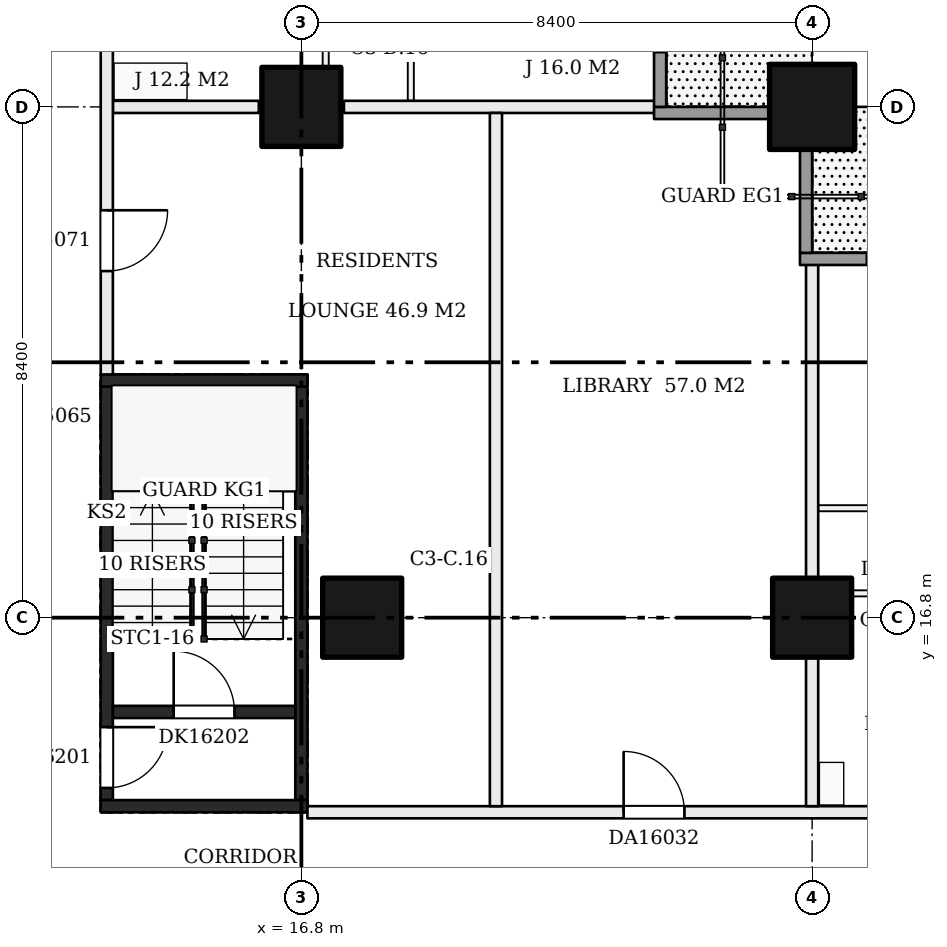
"""IFC4 building model, lengths in metres.
Left out: names, types, materials, properties, quantities, classifications, styles, units other than length and angle.
Written with IfcOpenShell. Run it as: python <this file> out.ifc"""

import sys

from ifc_helpers import new_model, si_unit, direction, frame, frame_2d, origin, origin_2d, place, context, subcontext, project, spatial, rectangle, extrude, element, fill, save


model = new_model("IFC4")
c1 = context("Model", 3, precision=1e-05, world=origin(), true_north=direction((0.0, 1.0)))
c2 = subcontext(c1, "Body", "Model", "MODEL_VIEW")
j1 = project(units=[si_unit("LENGTHUNIT", "METRE"), si_unit("PLANEANGLEUNIT", "RADIAN")], contexts=[c1])
p1 = place(None, origin())
s1 = spatial("IfcSite", under=j1, at=p1, CompositionType="ELEMENT")
p2 = place(p1, origin())
s2 = spatial("IfcBuilding", under=s1, at=p2, CompositionType="ELEMENT")
p3 = place(p2, frame((0.0, 0.0, 67.2)))
s3 = spatial("IfcBuildingStorey", under=s2, at=p3, CompositionType="ELEMENT", Elevation=67.2)
for number, where, z_axis, x_axis in (
    (1, (17.8, 16.8, 0.0), (0.0, 0.0, 1.0), (1.0, 0.0, 0.0)),
    (2, (16.8, 25.2, 0.0), (0.0, 0.0, 1.0), (1.0, 0.0, 0.0)),
    (3, (25.2, 16.8, 0.0), (0.0, 0.0, 1.0), (1.0, 0.0, 0.0)),
):
    element("IfcColumn", number, at=place(p3, frame(where, z_axis=z_axis, x_axis=x_axis)), inside=s3, PredefinedType="COLUMN", context=c2, shape_type="SweptSolid", body=[
        extrude(rectangle(XDim=1.3, YDim=1.3, at=origin_2d()), origin(), (0.0, 0.0, 1.0), 3.22),
    ])
p4 = place(p3, frame((25.2, 25.2, 0.0), z_axis=(0.0, 0.0, 1.0), x_axis=(1.0, 0.0, 0.0)))
e4 = element("IfcColumn", 4, at=p4, inside=s3, PredefinedType="COLUMN", context=c2, shape_type="SweptSolid", body=[
    extrude(rectangle(XDim=1.4, YDim=1.4, at=origin_2d()), origin(), (0.0, 0.0, 1.0), 3.22),
])
p5 = place(p3, frame((13.6, 13.8, 0.0), z_axis=(0.0, 0.0, 1.0), x_axis=(0.0, 1.0, 0.0)))
e5 = element("IfcWall", 5, at=p5, inside=s3, PredefinedType="SHEAR", context=c2, shape_type="SweptSolid", body=[
    extrude(rectangle(XDim=6.8, YDim=0.2, at=frame_2d((3.4, 0.0))), origin(), (0.0, 0.0, 1.0), 3.22),
])
p6 = place(p5, frame((0.2, 0.0, 0.0)))
e6 = element("IfcOpeningElement", 6, at=p6, cuts=e5, PredefinedType="OPENING", context=c2, shape_type="SweptSolid", body=[
    extrude(rectangle(XDim=1.0, YDim=2.1, at=frame_2d((0.5, 1.05))), frame((0.0, 0.11, 0.0), z_axis=(0.0, -1.0, 0.0), x_axis=(1.0, 0.0, 0.0)), (0.0, 0.0, 1.0), 0.22),
])
p7 = place(p3, frame((16.8, 13.8, 0.0), z_axis=(0.0, 0.0, 1.0), x_axis=(0.0, 1.0, 0.0)))
e7 = element("IfcWall", 7, at=p7, inside=s3, PredefinedType="SHEAR", context=c2, shape_type="SweptSolid", body=[
    extrude(rectangle(XDim=6.8, YDim=0.2, at=frame_2d((3.4, 0.0))), origin(), (0.0, 0.0, 1.0), 3.22),
])
for number, where, z_axis, x_axis in (
    (8, (13.5, 13.7, 0.0), (0.0, 0.0, 1.0), (1.0, 0.0, 0.0)),
    (9, (13.5, 20.7, 0.0), (0.0, 0.0, 1.0), (1.0, 0.0, 0.0)),
):
    element("IfcWall", number, at=place(p3, frame(where, z_axis=z_axis, x_axis=x_axis)), inside=s3, PredefinedType="SHEAR", context=c2, shape_type="SweptSolid", body=[
        extrude(rectangle(XDim=3.4, YDim=0.2, at=frame_2d((1.7, 0.0))), origin(), (0.0, 0.0, 1.0), 3.22),
    ])
p8 = place(p3, frame((13.7, 15.25, 0.0), z_axis=(0.0, 0.0, 1.0), x_axis=(1.0, 0.0, 0.0)))
e10 = element("IfcWall", 10, at=p8, inside=s3, PredefinedType="SHEAR", context=c2, shape_type="SweptSolid", body=[
    extrude(rectangle(XDim=3.0, YDim=0.2, at=frame_2d((1.5, 0.0))), origin(), (0.0, 0.0, 1.0), 3.22),
])
p9 = place(p8, frame((1.0, 0.0, 0.0)))
e11 = element("IfcOpeningElement", 11, at=p9, cuts=e10, PredefinedType="OPENING", context=c2, shape_type="SweptSolid", body=[
    extrude(rectangle(XDim=1.0, YDim=2.1, at=frame_2d((0.5, 1.05))), frame((0.0, 0.11, 0.0), z_axis=(0.0, -1.0, 0.0), x_axis=(1.0, 0.0, 0.0)), (0.0, 0.0, 1.0), 0.22),
])
p10 = place(p3, frame((16.9, 13.6, 0.0), z_axis=(0.0, 0.0, 1.0), x_axis=(1.0, 0.0, 0.0)))
e12 = element("IfcWall", 12, at=p10, inside=s3, PredefinedType="PARTITIONING", context=c2, shape_type="SweptSolid", body=[
    extrude(rectangle(XDim=25.1, YDim=0.2, at=frame_2d((12.55, 0.0))), origin(), (0.0, 0.0, 1.0), 3.22),
])
p11 = place(p10, frame((15.1, 0.0, 0.0)))
e13 = element("IfcOpeningElement", 13, at=p11, cuts=e12, PredefinedType="OPENING", context=c2, shape_type="SweptSolid", body=[
    extrude(rectangle(XDim=1.0, YDim=2.1, at=frame_2d((0.5, 1.05))), frame((0.0, 0.11, 0.0), z_axis=(0.0, -1.0, 0.0), x_axis=(1.0, 0.0, 0.0)), (0.0, 0.0, 1.0), 0.22),
])
p12 = place(p10, frame((23.64, 0.0, 0.0)))
e14 = element("IfcOpeningElement", 14, at=p12, cuts=e12, PredefinedType="OPENING", context=c2, shape_type="SweptSolid", body=[
    extrude(rectangle(XDim=1.0, YDim=2.1, at=frame_2d((0.5, 1.05))), frame((0.0, 0.11, 0.0), z_axis=(0.0, -1.0, 0.0), x_axis=(1.0, 0.0, 0.0)), (0.0, 0.0, 1.0), 0.22),
])
p13 = place(p10, frame((5.2, 0.0, 0.0)))
e15 = element("IfcOpeningElement", 15, at=p13, cuts=e12, PredefinedType="OPENING", context=c2, shape_type="SweptSolid", body=[
    extrude(rectangle(XDim=1.0, YDim=2.1, at=frame_2d((0.5, 1.05))), frame((0.0, 0.11, 0.0), z_axis=(0.0, -1.0, 0.0), x_axis=(1.0, 0.0, 0.0)), (0.0, 0.0, 1.0), 0.22),
])
p14 = place(p3, frame((25.3, 17.2, 0.0), z_axis=(0.0, 0.0, 1.0), x_axis=(1.0, 0.0, 0.0)))
e16 = element("IfcWall", 16, at=p14, inside=s3, PredefinedType="PARTITIONING", context=c2, shape_type="SweptSolid", body=[
    extrude(rectangle(XDim=12.4, YDim=0.1, at=frame_2d((6.2, 0.0))), origin(), (0.0, 0.0, 1.0), 3.22),
])
p15 = place(p14, frame((6.5, 0.0, 0.0)))
e17 = element("IfcOpeningElement", 17, at=p15, cuts=e16, PredefinedType="OPENING", context=c2, shape_type="SweptSolid", body=[
    extrude(rectangle(XDim=0.9, YDim=2.1, at=frame_2d((0.45, 1.05))), frame((0.0, 0.06, 0.0), z_axis=(0.0, -1.0, 0.0), x_axis=(1.0, 0.0, 0.0)), (0.0, 0.0, 1.0), 0.12),
])
p16 = place(p14, frame((1.0, 0.0, 0.0)))
e18 = element("IfcOpeningElement", 18, at=p16, cuts=e16, PredefinedType="OPENING", context=c2, shape_type="SweptSolid", body=[
    extrude(rectangle(XDim=0.9, YDim=2.1, at=frame_2d((0.45, 1.05))), frame((0.0, 0.06, 0.0), z_axis=(0.0, -1.0, 0.0), x_axis=(1.0, 0.0, 0.0)), (0.0, 0.0, 1.0), 0.12),
])
p17 = place(p14, frame((4.0, 0.0, 0.0)))
e19 = element("IfcOpeningElement", 19, at=p17, cuts=e16, PredefinedType="OPENING", context=c2, shape_type="SweptSolid", body=[
    extrude(rectangle(XDim=0.9, YDim=2.1, at=frame_2d((0.45, 1.05))), frame((0.0, 0.06, 0.0), z_axis=(0.0, -1.0, 0.0), x_axis=(1.0, 0.0, 0.0)), (0.0, 0.0, 1.0), 0.12),
])
p18 = place(p14, frame((10.1, 0.0, 0.0)))
e20 = element("IfcOpeningElement", 20, at=p18, cuts=e16, PredefinedType="OPENING", context=c2, shape_type="SweptSolid", body=[
    extrude(rectangle(XDim=0.9, YDim=2.1, at=frame_2d((0.45, 1.05))), frame((0.0, 0.06, 0.0), z_axis=(0.0, -1.0, 0.0), x_axis=(1.0, 0.0, 0.0)), (0.0, 0.0, 1.0), 0.12),
])
p19 = place(p3, frame((25.3, 18.6, 0.0), z_axis=(0.0, 0.0, 1.0), x_axis=(1.0, 0.0, 0.0)))
e21 = element("IfcWall", 21, at=p19, inside=s3, PredefinedType="PARTITIONING", context=c2, shape_type="SweptSolid", body=[
    extrude(rectangle(XDim=16.7, YDim=0.1, at=frame_2d((8.35, 0.0))), origin(), (0.0, 0.0, 1.0), 3.22),
])
p20 = place(p19, frame((1.5, 0.0, 0.0)))
e22 = element("IfcOpeningElement", 22, at=p20, cuts=e21, PredefinedType="OPENING", context=c2, shape_type="SweptSolid", body=[
    extrude(rectangle(XDim=0.9, YDim=2.1, at=frame_2d((0.45, 1.05))), frame((0.0, 0.06, 0.0), z_axis=(0.0, -1.0, 0.0), x_axis=(1.0, 0.0, 0.0)), (0.0, 0.0, 1.0), 0.12),
])
p21 = place(p19, frame((6.9, 0.0, 0.0)))
e23 = element("IfcOpeningElement", 23, at=p21, cuts=e21, PredefinedType="OPENING", context=c2, shape_type="SweptSolid", body=[
    extrude(rectangle(XDim=0.9, YDim=2.1, at=frame_2d((0.45, 1.05))), frame((0.0, 0.06, 0.0), z_axis=(0.0, -1.0, 0.0), x_axis=(1.0, 0.0, 0.0)), (0.0, 0.0, 1.0), 0.12),
])
p22 = place(p19, frame((15.24, 0.0, 0.0)))
e24 = element("IfcOpeningElement", 24, at=p22, cuts=e21, PredefinedType="OPENING", context=c2, shape_type="SweptSolid", body=[
    extrude(rectangle(XDim=0.9, YDim=2.1, at=frame_2d((0.45, 1.05))), frame((0.0, 0.06, 0.0), z_axis=(0.0, -1.0, 0.0), x_axis=(1.0, 0.0, 0.0)), (0.0, 0.0, 1.0), 0.12),
])
p23 = place(p19, frame((13.2, 0.0, 0.0)))
e25 = element("IfcOpeningElement", 25, at=p23, cuts=e21, PredefinedType="OPENING", context=c2, shape_type="SweptSolid", body=[
    extrude(rectangle(XDim=0.9, YDim=2.1, at=frame_2d((0.45, 1.05))), frame((0.0, 0.06, 0.0), z_axis=(0.0, -1.0, 0.0), x_axis=(1.0, 0.0, 0.0)), (0.0, 0.0, 1.0), 0.12),
])
p24 = place(p3, frame((13.7, 25.2, 0.0), z_axis=(0.0, 0.0, 1.0), x_axis=(1.0, 0.0, 0.0)))
e26 = element("IfcWall", 26, at=p24, inside=s3, PredefinedType="PARTITIONING", context=c2, shape_type="SweptSolid", body=[
    extrude(rectangle(XDim=2.4, YDim=0.2, at=frame_2d((1.2, 0.0))), origin(), (0.0, 0.0, 1.0), 3.22),
])
p25 = place(p3, frame((17.5, 25.2, 0.0), z_axis=(0.0, 0.0, 1.0), x_axis=(1.0, 0.0, 0.0)))
e27 = element("IfcWall", 27, at=p25, inside=s3, PredefinedType="PARTITIONING", context=c2, shape_type="SweptSolid", body=[
    extrude(rectangle(XDim=5.2, YDim=0.2, at=frame_2d((2.6, 0.0))), origin(), (0.0, 0.0, 1.0), 3.22),
])
p26 = place(p3, frame((13.6, 20.8, 0.0), z_axis=(0.0, 0.0, 1.0), x_axis=(0.0, 1.0, 0.0)))
e28 = element("IfcWall", 28, at=p26, inside=s3, PredefinedType="PARTITIONING", context=c2, shape_type="SweptSolid", body=[
    extrude(rectangle(XDim=21.2, YDim=0.2, at=frame_2d((10.6, 0.0))), origin(), (0.0, 0.0, 1.0), 3.22),
])
p27 = place(p26, frame((15.0, 0.0, 0.0)))
e29 = element("IfcOpeningElement", 29, at=p27, cuts=e28, PredefinedType="OPENING", context=c2, shape_type="SweptSolid", body=[
    extrude(rectangle(XDim=1.0, YDim=2.1, at=frame_2d((0.5, 1.05))), frame((0.0, 0.11, 0.0), z_axis=(0.0, -1.0, 0.0), x_axis=(1.0, 0.0, 0.0)), (0.0, 0.0, 1.0), 0.22),
])
p28 = place(p26, frame((17.5, 0.0, 0.0)))
e30 = element("IfcOpeningElement", 30, at=p28, cuts=e28, PredefinedType="OPENING", context=c2, shape_type="SweptSolid", body=[
    extrude(rectangle(XDim=1.0, YDim=2.1, at=frame_2d((0.5, 1.05))), frame((0.0, 0.11, 0.0), z_axis=(0.0, -1.0, 0.0), x_axis=(1.0, 0.0, 0.0)), (0.0, 0.0, 1.0), 0.22),
])
p29 = place(p26, frame((1.7, 0.0, 0.0)))
e31 = element("IfcOpeningElement", 31, at=p29, cuts=e28, PredefinedType="OPENING", context=c2, shape_type="SweptSolid", body=[
    extrude(rectangle(XDim=1.0, YDim=2.1, at=frame_2d((0.5, 1.05))), frame((0.0, 0.11, 0.0), z_axis=(0.0, -1.0, 0.0), x_axis=(1.0, 0.0, 0.0)), (0.0, 0.0, 1.0), 0.22),
])
p30 = place(p3, frame((17.2, 25.3, 0.0), z_axis=(0.0, 0.0, 1.0), x_axis=(0.0, 1.0, 0.0)))
e32 = element("IfcWall", 32, at=p30, inside=s3, PredefinedType="PARTITIONING", context=c2, shape_type="SweptSolid", body=[
    extrude(rectangle(XDim=12.4, YDim=0.1, at=frame_2d((6.2, 0.0))), origin(), (0.0, 0.0, 1.0), 3.22),
])
p31 = place(p30, frame((10.5, 0.0, 0.0)))
e33 = element("IfcOpeningElement", 33, at=p31, cuts=e32, PredefinedType="OPENING", context=c2, shape_type="SweptSolid", body=[
    extrude(rectangle(XDim=0.9, YDim=2.1, at=frame_2d((0.45, 1.05))), frame((0.0, 0.06, 0.0), z_axis=(0.0, -1.0, 0.0), x_axis=(1.0, 0.0, 0.0)), (0.0, 0.0, 1.0), 0.12),
])
p32 = place(p30, frame((1.4, 0.0, 0.0)))
e34 = element("IfcOpeningElement", 34, at=p32, cuts=e32, PredefinedType="OPENING", context=c2, shape_type="SweptSolid", body=[
    extrude(rectangle(XDim=0.9, YDim=2.1, at=frame_2d((0.45, 1.05))), frame((0.0, 0.06, 0.0), z_axis=(0.0, -1.0, 0.0), x_axis=(1.0, 0.0, 0.0)), (0.0, 0.0, 1.0), 0.12),
])
p33 = place(p30, frame((4.6, 0.0, 0.0)))
e35 = element("IfcOpeningElement", 35, at=p33, cuts=e32, PredefinedType="OPENING", context=c2, shape_type="SweptSolid", body=[
    extrude(rectangle(XDim=0.9, YDim=2.1, at=frame_2d((0.45, 1.05))), frame((0.0, 0.06, 0.0), z_axis=(0.0, -1.0, 0.0), x_axis=(1.0, 0.0, 0.0)), (0.0, 0.0, 1.0), 0.12),
])
p34 = place(p30, frame((6.5, 0.0, 0.0)))
e36 = element("IfcOpeningElement", 36, at=p34, cuts=e32, PredefinedType="OPENING", context=c2, shape_type="SweptSolid", body=[
    extrude(rectangle(XDim=0.9, YDim=2.1, at=frame_2d((0.45, 1.05))), frame((0.0, 0.06, 0.0), z_axis=(0.0, -1.0, 0.0), x_axis=(1.0, 0.0, 0.0)), (0.0, 0.0, 1.0), 0.12),
])
p35 = place(p3, frame((18.6, 25.3, 0.0), z_axis=(0.0, 0.0, 1.0), x_axis=(0.0, 1.0, 0.0)))
e37 = element("IfcWall", 37, at=p35, inside=s3, PredefinedType="PARTITIONING", context=c2, shape_type="SweptSolid", body=[
    extrude(rectangle(XDim=12.4, YDim=0.1, at=frame_2d((6.2, 0.0))), origin(), (0.0, 0.0, 1.0), 3.22),
])
p36 = place(p35, frame((1.5, 0.0, 0.0)))
e38 = element("IfcOpeningElement", 38, at=p36, cuts=e37, PredefinedType="OPENING", context=c2, shape_type="SweptSolid", body=[
    extrude(rectangle(XDim=0.9, YDim=2.1, at=frame_2d((0.45, 1.05))), frame((0.0, 0.06, 0.0), z_axis=(0.0, -1.0, 0.0), x_axis=(1.0, 0.0, 0.0)), (0.0, 0.0, 1.0), 0.12),
])
p37 = place(p35, frame((6.9, 0.0, 0.0)))
e39 = element("IfcOpeningElement", 39, at=p37, cuts=e37, PredefinedType="OPENING", context=c2, shape_type="SweptSolid", body=[
    extrude(rectangle(XDim=0.9, YDim=2.1, at=frame_2d((0.45, 1.05))), frame((0.0, 0.06, 0.0), z_axis=(0.0, -1.0, 0.0), x_axis=(1.0, 0.0, 0.0)), (0.0, 0.0, 1.0), 0.12),
])
p38 = place(p3, frame((20.0, 13.7, 0.0), z_axis=(0.0, 0.0, 1.0), x_axis=(0.0, 1.0, 0.0)))
e40 = element("IfcWall", 40, at=p38, inside=s3, PredefinedType="PARTITIONING", context=c2, shape_type="SweptSolid", body=[
    extrude(rectangle(XDim=11.4, YDim=0.2, at=frame_2d((5.7, 0.0))), origin(), (0.0, 0.0, 1.0), 3.22),
])
p39 = place(p3, frame((25.2, 13.7, 0.0), z_axis=(0.0, 0.0, 1.0), x_axis=(0.0, 1.0, 0.0)))
e41 = element("IfcWall", 41, at=p39, inside=s3, PredefinedType="PARTITIONING", context=c2, shape_type="SweptSolid", body=[
    extrude(rectangle(XDim=9.0, YDim=0.2, at=frame_2d((4.5, 0.0))), origin(), (0.0, 0.0, 1.0), 3.22),
])
p40 = place(p3, frame((42.0, 22.7, 0.0), z_axis=(0.0, 0.0, 1.0), x_axis=(-1.0, 0.0, 0.0)))
e42 = element("IfcWall", 42, at=p40, inside=s3, PredefinedType="SOLIDWALL", context=c2, shape_type="SweptSolid", body=[
    extrude(rectangle(XDim=17.0, YDim=0.2, at=frame_2d((8.5, 0.0))), origin(), (0.0, 0.0, 1.0), 3.22),
])
p41 = place(p40, frame((13.5, 0.0, 0.9)))
e43 = element("IfcOpeningElement", 43, at=p41, cuts=e42, PredefinedType="OPENING", context=c2, shape_type="SweptSolid", body=[
    extrude(rectangle(XDim=2.4, YDim=1.5, at=frame_2d((1.2, 0.75))), frame((0.0, 0.11, 0.0), z_axis=(0.0, -1.0, 0.0), x_axis=(1.0, 0.0, 0.0)), (0.0, 0.0, 1.0), 0.22),
])
p42 = place(p40, frame((9.3, 0.0, 0.0)))
e44 = element("IfcOpeningElement", 44, at=p42, cuts=e42, PredefinedType="OPENING", context=c2, shape_type="SweptSolid", body=[
    extrude(rectangle(XDim=2.4, YDim=2.2, at=frame_2d((1.2, 1.1))), frame((0.0, 0.11, 0.0), z_axis=(0.0, -1.0, 0.0), x_axis=(1.0, 0.0, 0.0)), (0.0, 0.0, 1.0), 0.22),
])
p43 = place(p40, frame((5.1, 0.0, 0.0)))
e45 = element("IfcOpeningElement", 45, at=p43, cuts=e42, PredefinedType="OPENING", context=c2, shape_type="SweptSolid", body=[
    extrude(rectangle(XDim=2.4, YDim=2.2, at=frame_2d((1.2, 1.1))), frame((0.0, 0.11, 0.0), z_axis=(0.0, -1.0, 0.0), x_axis=(1.0, 0.0, 0.0)), (0.0, 0.0, 1.0), 0.22),
])
p44 = place(p40, frame((0.9, 0.0, 0.0)))
e46 = element("IfcOpeningElement", 46, at=p44, cuts=e42, PredefinedType="OPENING", context=c2, shape_type="SweptSolid", body=[
    extrude(rectangle(XDim=2.4, YDim=2.2, at=frame_2d((1.2, 1.1))), frame((0.0, 0.11, 0.0), z_axis=(0.0, -1.0, 0.0), x_axis=(1.0, 0.0, 0.0)), (0.0, 0.0, 1.0), 0.22),
])
p45 = place(p3, frame((25.1, 22.8, 0.0), z_axis=(0.0, 0.0, 1.0), x_axis=(0.0, 1.0, 0.0)))
e47 = element("IfcWall", 47, at=p45, inside=s3, PredefinedType="SOLIDWALL", context=c2, shape_type="SweptSolid", body=[
    extrude(rectangle(XDim=1.7, YDim=0.2, at=frame_2d((0.85, 0.0))), origin(), (0.0, 0.0, 1.0), 3.22),
])
p46 = place(p3, frame((24.5, 25.1, 0.0), z_axis=(0.0, 0.0, 1.0), x_axis=(-1.0, 0.0, 0.0)))
e48 = element("IfcWall", 48, at=p46, inside=s3, PredefinedType="SOLIDWALL", context=c2, shape_type="SweptSolid", body=[
    extrude(rectangle(XDim=1.9, YDim=0.2, at=frame_2d((0.95, 0.0))), origin(), (0.0, 0.0, 1.0), 3.22),
])
p47 = place(p3, frame((22.7, 25.2, 0.0), z_axis=(0.0, 0.0, 1.0), x_axis=(0.0, 1.0, 0.0)))
e49 = element("IfcWall", 49, at=p47, inside=s3, PredefinedType="SOLIDWALL", context=c2, shape_type="SweptSolid", body=[
    extrude(rectangle(XDim=16.8, YDim=0.2, at=frame_2d((8.4, 0.0))), origin(), (0.0, 0.0, 1.0), 3.22),
])
p48 = place(p47, frame((0.9, 0.0, 0.9)))
e50 = element("IfcOpeningElement", 50, at=p48, cuts=e49, PredefinedType="OPENING", context=c2, shape_type="SweptSolid", body=[
    extrude(rectangle(XDim=2.4, YDim=1.5, at=frame_2d((1.2, 0.75))), frame((0.0, 0.11, 0.0), z_axis=(0.0, -1.0, 0.0), x_axis=(1.0, 0.0, 0.0)), (0.0, 0.0, 1.0), 0.22),
])
p49 = place(p47, frame((5.1, 0.0, 0.0)))
e51 = element("IfcOpeningElement", 51, at=p49, cuts=e49, PredefinedType="OPENING", context=c2, shape_type="SweptSolid", body=[
    extrude(rectangle(XDim=2.4, YDim=2.2, at=frame_2d((1.2, 1.1))), frame((0.0, 0.11, 0.0), z_axis=(0.0, -1.0, 0.0), x_axis=(1.0, 0.0, 0.0)), (0.0, 0.0, 1.0), 0.22),
])
p50 = place(p47, frame((9.3, 0.0, 0.0)))
e52 = element("IfcOpeningElement", 52, at=p50, cuts=e49, PredefinedType="OPENING", context=c2, shape_type="SweptSolid", body=[
    extrude(rectangle(XDim=2.4, YDim=2.2, at=frame_2d((1.2, 1.1))), frame((0.0, 0.11, 0.0), z_axis=(0.0, -1.0, 0.0), x_axis=(1.0, 0.0, 0.0)), (0.0, 0.0, 1.0), 0.22),
])
p51 = place(p47, frame((13.5, 0.0, 0.0)))
e53 = element("IfcOpeningElement", 53, at=p51, cuts=e49, PredefinedType="OPENING", context=c2, shape_type="SweptSolid", body=[
    extrude(rectangle(XDim=2.4, YDim=2.2, at=frame_2d((1.2, 1.1))), frame((0.0, 0.11, 0.0), z_axis=(0.0, -1.0, 0.0), x_axis=(1.0, 0.0, 0.0)), (0.0, 0.0, 1.0), 0.22),
])
p52 = place(p6, frame((1.0, 0.0, 0.0), z_axis=(0.0, 0.0, 1.0), x_axis=(-1.0, 0.0, 0.0)))
e54 = element("IfcDoor", 54, at=p52, inside=s3, OperationType="SINGLE_SWING_LEFT", PredefinedType="DOOR", context=c2, shape_type="SweptSolid", body=[
    extrude(rectangle(XDim=1.0, YDim=2.1, at=frame_2d((0.5, 1.05))), frame((0.0, 0.025, 0.0), z_axis=(0.0, -1.0, 0.0), x_axis=(1.0, 0.0, 0.0)), (0.0, 0.0, 1.0), 0.05),
])
fill(e6, e54)
p53 = place(p9, origin())
e55 = element("IfcDoor", 55, at=p53, inside=s3, OperationType="SINGLE_SWING_LEFT", PredefinedType="DOOR", context=c2, shape_type="SweptSolid", body=[
    extrude(rectangle(XDim=1.0, YDim=2.1, at=frame_2d((0.5, 1.05))), frame((0.0, 0.025, 0.0), z_axis=(0.0, -1.0, 0.0), x_axis=(1.0, 0.0, 0.0)), (0.0, 0.0, 1.0), 0.05),
])
fill(e11, e55)
p54 = place(p13, origin())
e56 = element("IfcDoor", 56, at=p54, inside=s3, OperationType="SINGLE_SWING_LEFT", PredefinedType="DOOR", context=c2, shape_type="SweptSolid", body=[
    extrude(rectangle(XDim=1.0, YDim=2.1, at=frame_2d((0.5, 1.05))), frame((0.0, 0.025, 0.0), z_axis=(0.0, -1.0, 0.0), x_axis=(1.0, 0.0, 0.0)), (0.0, 0.0, 1.0), 0.05),
])
fill(e15, e56)
p55 = place(p29, frame((1.0, 0.0, 0.0), z_axis=(0.0, 0.0, 1.0), x_axis=(-1.0, 0.0, 0.0)))
e57 = element("IfcDoor", 57, at=p55, inside=s3, OperationType="SINGLE_SWING_LEFT", PredefinedType="DOOR", context=c2, shape_type="SweptSolid", body=[
    extrude(rectangle(XDim=1.0, YDim=2.1, at=frame_2d((0.5, 1.05))), frame((0.0, 0.025, 0.0), z_axis=(0.0, -1.0, 0.0), x_axis=(1.0, 0.0, 0.0)), (0.0, 0.0, 1.0), 0.05),
])
fill(e31, e57)
p56 = place(p48, origin())
e58 = element("IfcWindow", 58, at=p56, inside=s3, PartitioningType="SINGLE_PANEL", PredefinedType="WINDOW", context=c2, shape_type="SweptSolid", body=[
    extrude(rectangle(XDim=2.4, YDim=1.5, at=frame_2d((1.2, 0.75))), frame((0.0, 0.03, 0.0), z_axis=(0.0, -1.0, 0.0), x_axis=(1.0, 0.0, 0.0)), (0.0, 0.0, 1.0), 0.06),
])
fill(e50, e58)
save(model, sys.argv[1])
